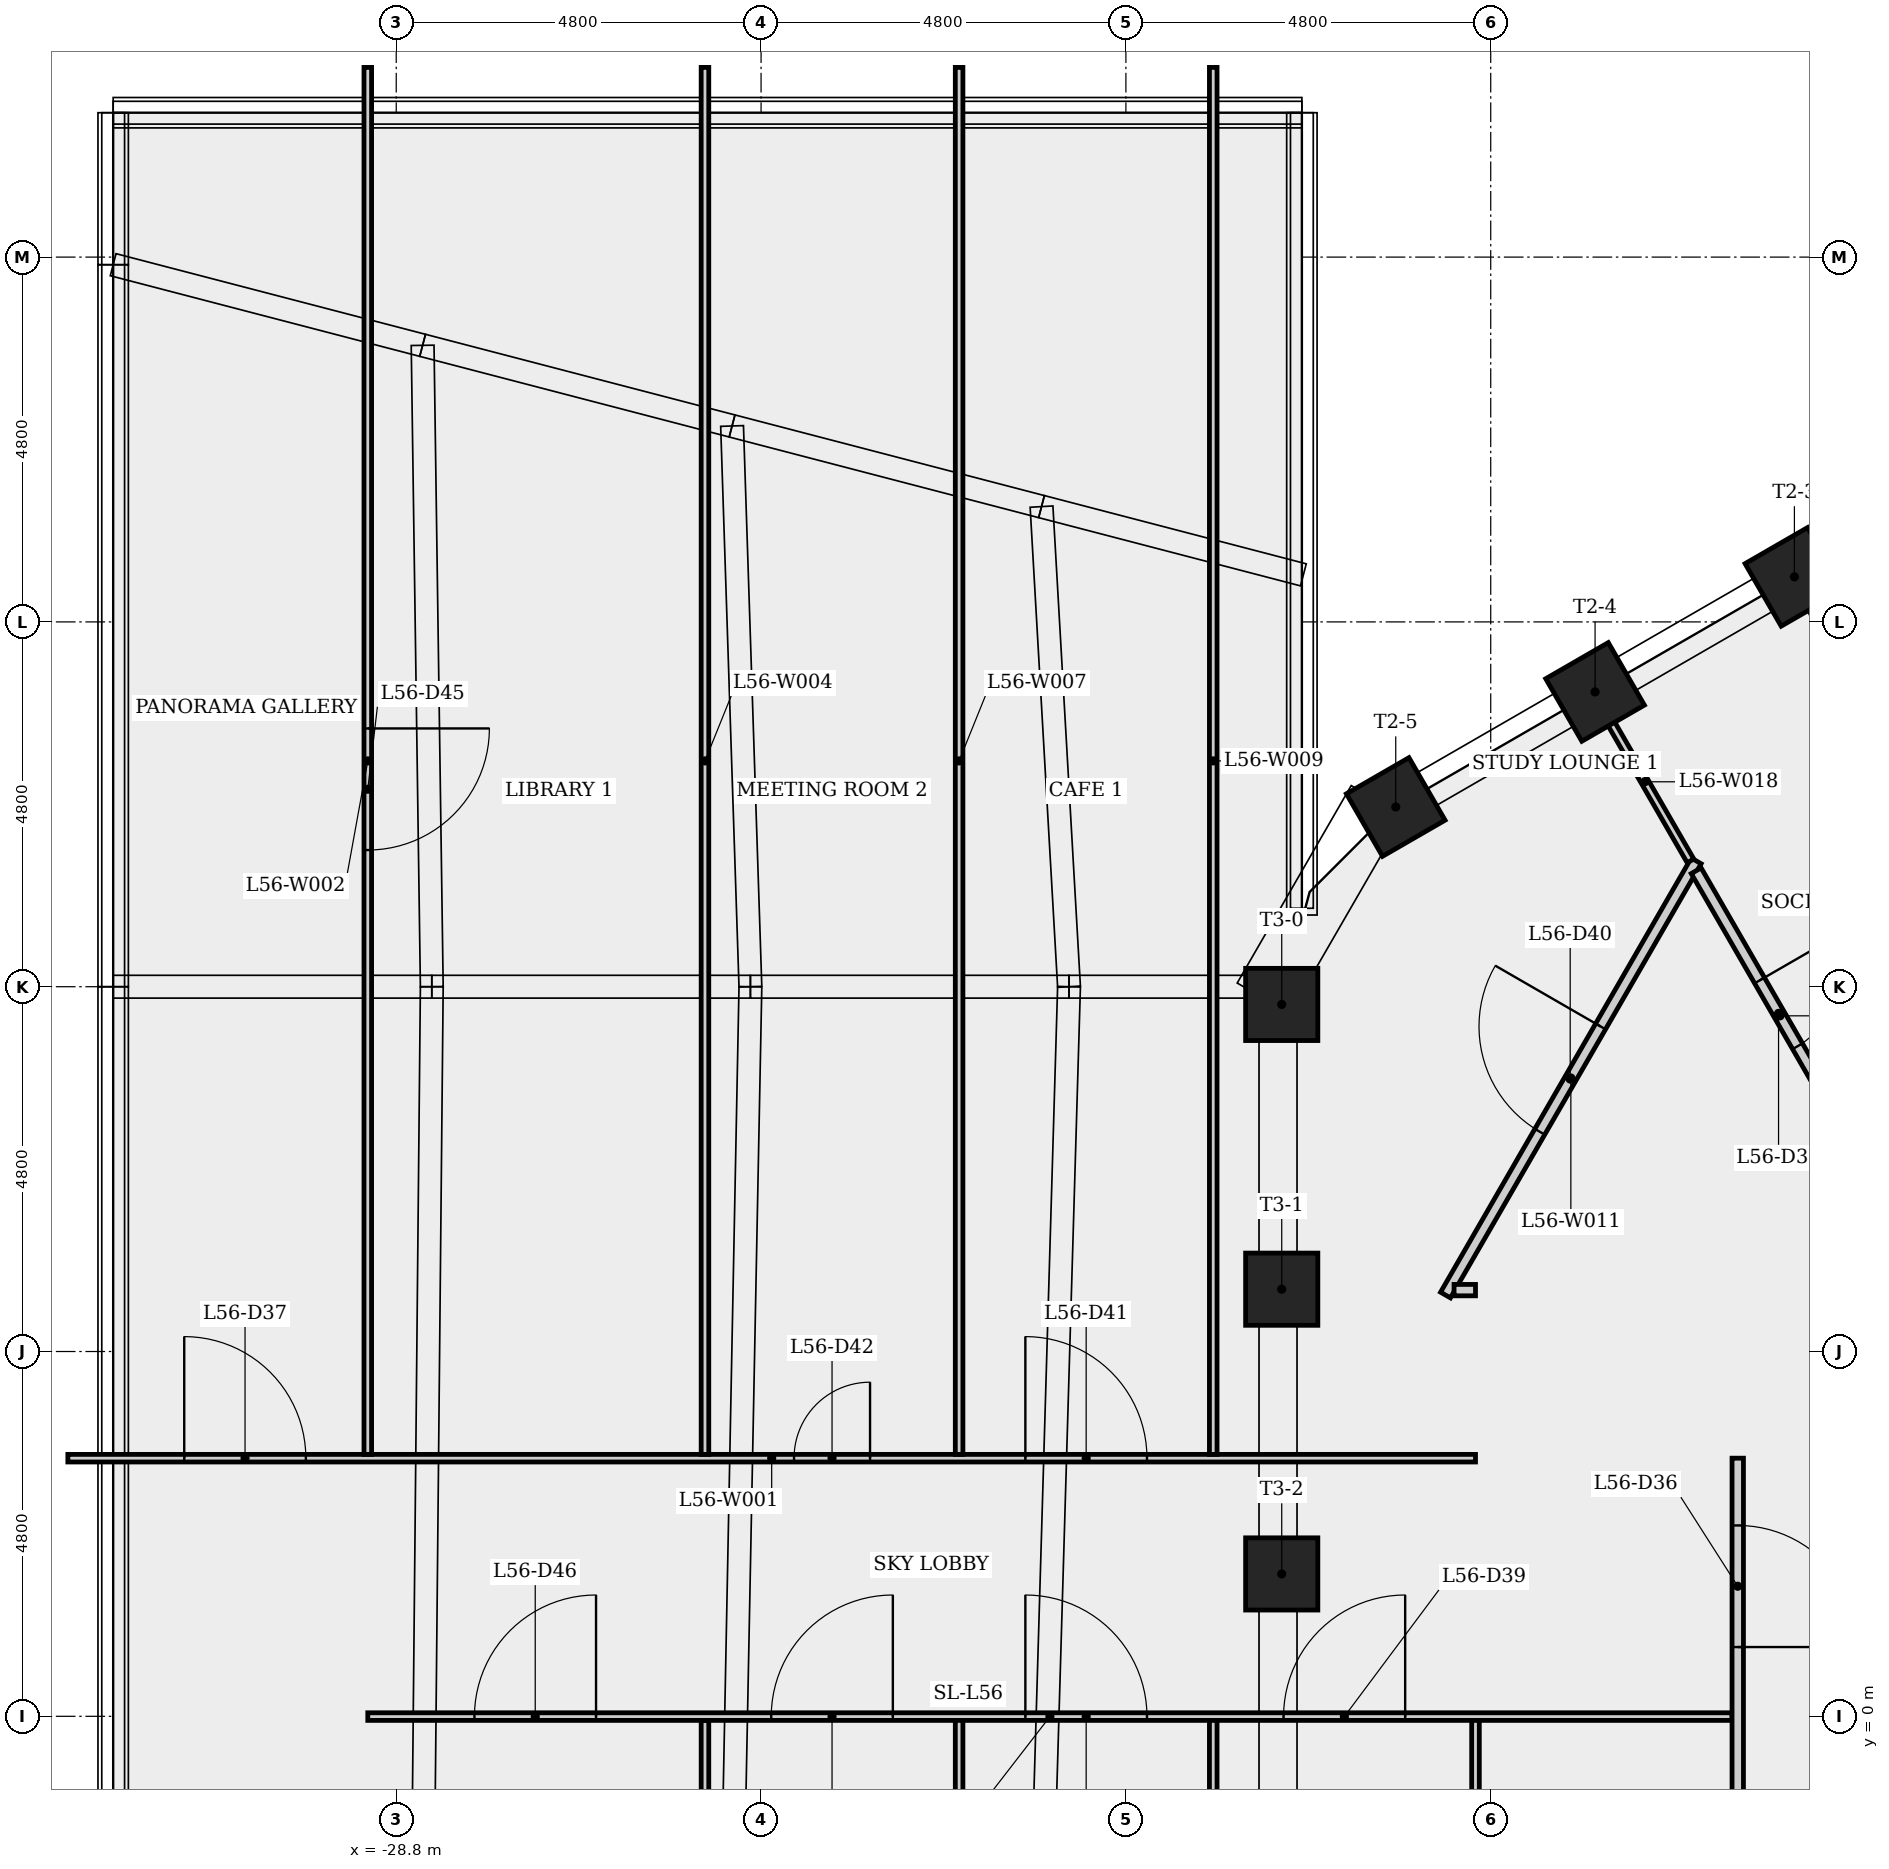
"""IFC4 building model, lengths in metres.
Left out: names, types, materials, properties, quantities, classifications, styles, units other than length and angle.
Written with IfcOpenShell. Run it as: python <this file> out.ifc"""

import sys

from ifc_helpers import new_model, si_unit, direction, frame, frame_2d, origin, origin_2d, place, context, subcontext, project, spatial, rectangle, extrude, element, fill, save


model = new_model("IFC4")
c1 = context("Model", 3, precision=1e-05, world=origin(), true_north=direction((0.0, 1.0)))
c2 = subcontext(c1, "Body", "Model", "MODEL_VIEW")
j1 = project(units=[si_unit("LENGTHUNIT", "METRE"), si_unit("PLANEANGLEUNIT", "RADIAN")], contexts=[c1])
p1 = place(None, origin())
s1 = spatial("IfcSite", under=j1, at=p1, CompositionType="ELEMENT")
p2 = place(p1, origin())
s2 = spatial("IfcBuilding", under=s1, at=p2, CompositionType="ELEMENT")
p3 = place(p2, frame((0.0, 0.0, 210.1)))
s3 = spatial("IfcBuildingStorey", under=s2, at=p3, CompositionType="ELEMENT", Elevation=210.1)
for number, where, z_axis, x_axis in (
    (1, (-10.405, 14.993, 0.0), (0.0, 0.0, 1.0), (-0.5, 0.866, 0.0)),
    (2, (-13.027, 13.479, 0.0), (0.0, 0.0, 1.0), (-0.5, 0.866, 0.0)),
    (3, (-15.65, 11.965, 0.0), (0.0, 0.0, 1.0), (-0.5, 0.866, 0.0)),
    (4, (-17.15, 9.366, 0.0), (0.0, 0.0, 1.0), (-1.0, 0.0, 0.0)),
    (5, (-17.15, 5.62, 0.0), (0.0, 0.0, 1.0), (-1.0, 0.0, 0.0)),
    (6, (-17.15, 1.873, 0.0), (0.0, 0.0, 1.0), (-1.0, 0.0, 0.0)),
):
    element("IfcColumn", number, at=place(p3, frame(where, z_axis=z_axis, x_axis=x_axis)), inside=s3, PredefinedType="COLUMN", context=c2, shape_type="SweptSolid", body=[
        extrude(rectangle(XDim=0.95, YDim=0.95, at=origin_2d()), origin(), (0.0, 0.0, 1.0), 4.0),
    ])
p4 = place(p3, frame((-33.12, 3.396, 0.0), z_axis=(0.0, 0.0, 1.0), x_axis=(1.0, 0.0, 0.0)))
e7 = element("IfcWall", 7, at=p4, inside=s3, PredefinedType="PARTITIONING", context=c2, shape_type="SweptSolid", body=[
    extrude(rectangle(XDim=18.52, YDim=0.1, at=frame_2d((9.26, 0.0))), origin(), (0.0, 0.0, 1.0), 3.6),
])
p5 = place(p4, frame((1.531, 0.0, 0.0)))
e8 = element("IfcOpeningElement", 8, at=p5, cuts=e7, PredefinedType="OPENING", context=c2, shape_type="SweptSolid", body=[
    extrude(rectangle(XDim=1.6, YDim=2.1, at=frame_2d((0.8, 1.05))), frame((0.0, 0.06, 0.0), z_axis=(0.0, -1.0, 0.0), x_axis=(1.0, 0.0, 0.0)), (0.0, 0.0, 1.0), 0.12),
])
p6 = place(p4, frame((12.598, 0.0, 0.0)))
e9 = element("IfcOpeningElement", 9, at=p6, cuts=e7, PredefinedType="OPENING", context=c2, shape_type="SweptSolid", body=[
    extrude(rectangle(XDim=1.6, YDim=2.1, at=frame_2d((0.8, 1.05))), frame((0.0, 0.06, 0.0), z_axis=(0.0, -1.0, 0.0), x_axis=(1.0, 0.0, 0.0)), (0.0, 0.0, 1.0), 0.12),
])
p7 = place(p4, frame((9.554, 0.0, 0.0)))
e10 = element("IfcOpeningElement", 10, at=p7, cuts=e7, PredefinedType="OPENING", context=c2, shape_type="SweptSolid", body=[
    extrude(rectangle(XDim=1.0, YDim=2.1, at=frame_2d((0.5, 1.05))), frame((0.0, 0.06, 0.0), z_axis=(0.0, -1.0, 0.0), x_axis=(1.0, 0.0, 0.0)), (0.0, 0.0, 1.0), 0.12),
])
p8 = place(p3, frame((-29.174, 21.696, 0.0), z_axis=(0.0, 0.0, 1.0), x_axis=(0.0, -1.0, 0.0)))
e11 = element("IfcWall", 11, at=p8, inside=s3, PredefinedType="PARTITIONING", context=c2, shape_type="SweptSolid", body=[
    extrude(rectangle(XDim=18.25, YDim=0.1, at=frame_2d((9.125, 0.0))), origin(), (0.0, 0.0, 1.0), 3.6),
])
p9 = place(p8, frame((8.698, 0.0, 0.0)))
e12 = element("IfcOpeningElement", 12, at=p9, cuts=e11, PredefinedType="OPENING", context=c2, shape_type="SweptSolid", body=[
    extrude(rectangle(XDim=1.6, YDim=2.1, at=frame_2d((0.8, 1.05))), frame((0.0, 0.06, 0.0), z_axis=(0.0, -1.0, 0.0), x_axis=(1.0, 0.0, 0.0)), (0.0, 0.0, 1.0), 0.12),
])
p10 = place(p3, frame((-24.738, -17.496, 0.0), z_axis=(0.0, 0.0, 1.0), x_axis=(0.0, 1.0, 0.0)))
e13 = element("IfcWall", 13, at=p10, inside=s3, PredefinedType="PARTITIONING", context=c2, shape_type="SweptSolid", body=[
    extrude(rectangle(XDim=17.442, YDim=0.1, at=frame_2d((8.721, 0.0))), origin(), (0.0, 0.0, 1.0), 3.275),
])
p11 = place(p3, frame((-24.738, 3.446, 0.0), z_axis=(0.0, 0.0, 1.0), x_axis=(0.0, 1.0, 0.0)))
e14 = element("IfcWall", 14, at=p11, inside=s3, PredefinedType="PARTITIONING", context=c2, shape_type="SweptSolid", body=[
    extrude(rectangle(XDim=18.25, YDim=0.1, at=frame_2d((9.125, 0.0))), origin(), (0.0, 0.0, 1.0), 3.6),
])
p12 = place(p3, frame((-29.174, -0.004, 0.0), z_axis=(0.0, 0.0, 1.0), x_axis=(1.0, 0.0, 0.0)))
e15 = element("IfcWall", 15, at=p12, inside=s3, PredefinedType="PARTITIONING", context=c2, shape_type="SweptSolid", body=[
    extrude(rectangle(XDim=17.949, YDim=0.1, at=frame_2d((8.975, 0.0))), origin(), (0.0, 0.0, 1.0), 3.6),
])
p13 = place(p12, frame((12.049, 0.0, 0.0)))
e16 = element("IfcOpeningElement", 16, at=p13, cuts=e15, PredefinedType="OPENING", context=c2, shape_type="SweptSolid", body=[
    extrude(rectangle(XDim=1.6, YDim=2.1, at=frame_2d((0.8, 1.05))), frame((0.0, 0.06, 0.0), z_axis=(0.0, -1.0, 0.0), x_axis=(1.0, 0.0, 0.0)), (0.0, 0.0, 1.0), 0.12),
])
p14 = place(p12, frame((8.652, 0.0, 0.0)))
e17 = element("IfcOpeningElement", 17, at=p14, cuts=e15, PredefinedType="OPENING", context=c2, shape_type="SweptSolid", body=[
    extrude(rectangle(XDim=1.6, YDim=2.1, at=frame_2d((0.8, 1.05))), frame((0.0, 0.06, 0.0), z_axis=(0.0, -1.0, 0.0), x_axis=(1.0, 0.0, 0.0)), (0.0, 0.0, 1.0), 0.12),
])
p15 = place(p12, frame((5.308, 0.0, 0.0)))
e18 = element("IfcOpeningElement", 18, at=p15, cuts=e15, PredefinedType="OPENING", context=c2, shape_type="SweptSolid", body=[
    extrude(rectangle(XDim=1.6, YDim=2.1, at=frame_2d((0.8, 1.05))), frame((0.0, 0.06, 0.0), z_axis=(0.0, -1.0, 0.0), x_axis=(1.0, 0.0, 0.0)), (0.0, 0.0, 1.0), 0.12),
])
p16 = place(p12, frame((1.403, 0.0, 0.0)))
e19 = element("IfcOpeningElement", 19, at=p16, cuts=e15, PredefinedType="OPENING", context=c2, shape_type="SweptSolid", body=[
    extrude(rectangle(XDim=1.6, YDim=2.1, at=frame_2d((0.8, 1.05))), frame((0.0, 0.06, 0.0), z_axis=(0.0, -1.0, 0.0), x_axis=(1.0, 0.0, 0.0)), (0.0, 0.0, 1.0), 0.12),
])
p17 = place(p3, frame((-21.394, -17.496, 0.0), z_axis=(0.0, 0.0, 1.0), x_axis=(0.0, 1.0, 0.0)))
e20 = element("IfcWall", 20, at=p17, inside=s3, PredefinedType="PARTITIONING", context=c2, shape_type="SweptSolid", body=[
    extrude(rectangle(XDim=17.442, YDim=0.1, at=frame_2d((8.721, 0.0))), origin(), (0.0, 0.0, 1.0), 3.6),
])
p18 = place(p3, frame((-21.394, 3.446, 0.0), z_axis=(0.0, 0.0, 1.0), x_axis=(0.0, 1.0, 0.0)))
e21 = element("IfcWall", 21, at=p18, inside=s3, PredefinedType="PARTITIONING", context=c2, shape_type="SweptSolid", body=[
    extrude(rectangle(XDim=18.25, YDim=0.1, at=frame_2d((9.125, 0.0))), origin(), (0.0, 0.0, 1.0), 3.6),
])
p19 = place(p3, frame((-18.051, -17.496, 0.0), z_axis=(0.0, 0.0, 1.0), x_axis=(0.0, 1.0, 0.0)))
e22 = element("IfcWall", 22, at=p19, inside=s3, PredefinedType="PARTITIONING", context=c2, shape_type="SweptSolid", body=[
    extrude(rectangle(XDim=17.442, YDim=0.1, at=frame_2d((8.721, 0.0))), origin(), (0.0, 0.0, 1.0), 3.6),
])
p20 = place(p3, frame((-18.051, 3.446, 0.0), z_axis=(0.0, 0.0, 1.0), x_axis=(0.0, 1.0, 0.0)))
e23 = element("IfcWall", 23, at=p20, inside=s3, PredefinedType="PARTITIONING", context=c2, shape_type="SweptSolid", body=[
    extrude(rectangle(XDim=18.25, YDim=0.1, at=frame_2d((9.125, 0.0))), origin(), (0.0, 0.0, 1.0), 3.6),
])
p21 = place(p3, frame((-14.995, 5.543, 0.0), z_axis=(0.0, 0.0, 1.0), x_axis=(0.500000102728, 0.866025344474, 0.0)))
e24 = element("IfcWall", 24, at=p21, inside=s3, PredefinedType="PARTITIONING", context=c2, shape_type="SweptSolid", body=[
    extrude(rectangle(XDim=6.597, YDim=0.15, at=frame_2d((3.298, 0.0))), origin(), (0.0, 0.0, 1.0), 3.6),
])
p22 = place(p21, frame((2.481, 0.0, 0.0)))
e25 = element("IfcOpeningElement", 25, at=p22, cuts=e24, PredefinedType="OPENING", context=c2, shape_type="SweptSolid", body=[
    extrude(rectangle(XDim=1.6, YDim=2.1, at=frame_2d((0.8, 1.05))), frame((0.0, 0.085, 0.0), z_axis=(0.0, -1.0, 0.0), x_axis=(1.0, 0.0, 0.0)), (0.0, 0.0, 1.0), 0.17),
])
p23 = place(p3, frame((-14.6, -10.789, 0.0), z_axis=(0.0, 0.0, 1.0), x_axis=(0.0, 1.0, 0.0)))
e26 = element("IfcWall", 26, at=p23, inside=s3, PredefinedType="PARTITIONING", context=c2, shape_type="SweptSolid", body=[
    extrude(rectangle(XDim=10.735, YDim=0.1, at=frame_2d((5.368, 0.0))), origin(), (0.0, 0.0, 1.0), 3.6),
])
p24 = place(p3, frame((-14.6, 5.608, 0.0), z_axis=(0.0, 0.0, 1.0), x_axis=(-1.0, 0.0, 0.0)))
e27 = element("IfcWall", 27, at=p24, inside=s3, PredefinedType="PARTITIONING", context=c2, shape_type="SweptSolid", body=[
    extrude(rectangle(XDim=0.282, YDim=0.15, at=frame_2d((0.141, 0.0))), origin(), (0.0, 0.0, 1.0), 3.6),
])
p25 = place(p3, frame((-11.697, 11.126, 0.0), z_axis=(0.0, 0.0, 1.0), x_axis=(0.499992488471, -0.866029740524, 0.0)))
e28 = element("IfcWall", 28, at=p25, inside=s3, PredefinedType="PARTITIONING", context=c2, shape_type="SweptSolid", body=[
    extrude(rectangle(XDim=4.409, YDim=0.15, at=frame_2d((2.204, 0.0))), origin(), (0.0, 0.0, 1.0), 3.6),
])
p26 = place(p25, frame((1.667, 0.0, 0.0)))
e29 = element("IfcOpeningElement", 29, at=p26, cuts=e28, PredefinedType="OPENING", context=c2, shape_type="SweptSolid", body=[
    extrude(rectangle(XDim=1.0, YDim=2.1, at=frame_2d((0.5, 1.05))), frame((0.0, 0.085, 0.0), z_axis=(0.0, -1.0, 0.0), x_axis=(1.0, 0.0, 0.0)), (0.0, 0.0, 1.0), 0.17),
])
p27 = place(p3, frame((-11.771, 11.256, 0.0), z_axis=(0.0, 0.0, 1.0), x_axis=(-0.50000677744, 0.866021490792, 0.0)))
e30 = element("IfcWall", 30, at=p27, inside=s3, PredefinedType="PARTITIONING", context=c2, shape_type="SweptSolid", body=[
    extrude(rectangle(XDim=2.403, YDim=0.1, at=frame_2d((1.202, 0.0))), origin(), (0.0, 0.0, 1.0), 3.6),
])
p28 = place(p3, frame((-11.15, 3.396, 0.0), z_axis=(0.0, 0.0, 1.0), x_axis=(0.0, -1.0, 0.0)))
e31 = element("IfcWall", 31, at=p28, inside=s3, PredefinedType="PARTITIONING", context=c2, shape_type="SweptSolid", body=[
    extrude(rectangle(XDim=9.228, YDim=0.15, at=frame_2d((4.614, 0.0))), origin(), (0.0, 0.0, 1.0), 3.6),
])
p29 = place(p28, frame((0.885, 0.0, 0.0)))
e32 = element("IfcOpeningElement", 32, at=p29, cuts=e31, PredefinedType="OPENING", context=c2, shape_type="SweptSolid", body=[
    extrude(rectangle(XDim=1.6, YDim=2.1, at=frame_2d((0.8, 1.05))), frame((0.0, 0.085, 0.0), z_axis=(0.0, -1.0, 0.0), x_axis=(1.0, 0.0, 0.0)), (0.0, 0.0, 1.0), 0.17),
])
p30 = place(p28, frame((5.829, 0.0, 0.0)))
e33 = element("IfcOpeningElement", 33, at=p30, cuts=e31, PredefinedType="OPENING", context=c2, shape_type="SweptSolid", body=[
    extrude(rectangle(XDim=1.0, YDim=2.1, at=frame_2d((0.5, 1.05))), frame((0.0, 0.085, 0.0), z_axis=(0.0, -1.0, 0.0), x_axis=(1.0, 0.0, 0.0)), (0.0, 0.0, 1.0), 0.17),
])
p31 = place(p3, frame((-6.931, 8.96, 0.0), z_axis=(0.0, 0.0, 1.0), x_axis=(-0.499982511794, 0.866035500369, 0.0)))
e34 = element("IfcWall", 34, at=p31, inside=s3, PredefinedType="PARTITIONING", context=c2, shape_type="SweptSolid", body=[
    extrude(rectangle(XDim=6.962, YDim=0.1, at=frame_2d((3.481, 0.0))), origin(), (0.0, 0.0, 1.0), 3.6),
])
p32 = place(p26, origin())
e35 = element("IfcDoor", 35, at=p32, inside=s3, OperationType="SINGLE_SWING_LEFT", PredefinedType="DOOR", context=c2, shape_type="SweptSolid", body=[
    extrude(rectangle(XDim=1.0, YDim=2.1, at=frame_2d((0.5, 1.05))), frame((0.0, 0.025, 0.0), z_axis=(0.0, -1.0, 0.0), x_axis=(1.0, 0.0, 0.0)), (0.0, 0.0, 1.0), 0.05),
])
fill(e29, e35)
p33 = place(p29, origin())
e36 = element("IfcDoor", 36, at=p33, inside=s3, OperationType="SINGLE_SWING_RIGHT", PredefinedType="DOOR", context=c2, shape_type="SweptSolid", body=[
    extrude(rectangle(XDim=1.6, YDim=2.1, at=frame_2d((0.8, 1.05))), frame((0.0, 0.025, 0.0), z_axis=(0.0, -1.0, 0.0), x_axis=(1.0, 0.0, 0.0)), (0.0, 0.0, 1.0), 0.05),
])
fill(e32, e36)
p34 = place(p5, origin())
e37 = element("IfcDoor", 37, at=p34, inside=s3, OperationType="SINGLE_SWING_LEFT", PredefinedType="DOOR", context=c2, shape_type="SweptSolid", body=[
    extrude(rectangle(XDim=1.6, YDim=2.1, at=frame_2d((0.8, 1.05))), frame((0.0, 0.025, 0.0), z_axis=(0.0, -1.0, 0.0), x_axis=(1.0, 0.0, 0.0)), (0.0, 0.0, 1.0), 0.05),
])
fill(e8, e37)
p35 = place(p13, origin())
e38 = element("IfcDoor", 38, at=p35, inside=s3, OperationType="SINGLE_SWING_RIGHT", PredefinedType="DOOR", context=c2, shape_type="SweptSolid", body=[
    extrude(rectangle(XDim=1.6, YDim=2.1, at=frame_2d((0.8, 1.05))), frame((0.0, 0.025, 0.0), z_axis=(0.0, -1.0, 0.0), x_axis=(1.0, 0.0, 0.0)), (0.0, 0.0, 1.0), 0.05),
])
fill(e16, e38)
p36 = place(p22, origin())
e39 = element("IfcDoor", 39, at=p36, inside=s3, OperationType="SINGLE_SWING_RIGHT", PredefinedType="DOOR", context=c2, shape_type="SweptSolid", body=[
    extrude(rectangle(XDim=1.6, YDim=2.1, at=frame_2d((0.8, 1.05))), frame((0.0, 0.025, 0.0), z_axis=(0.0, -1.0, 0.0), x_axis=(1.0, 0.0, 0.0)), (0.0, 0.0, 1.0), 0.05),
])
fill(e25, e39)
p37 = place(p6, origin())
e40 = element("IfcDoor", 40, at=p37, inside=s3, OperationType="SINGLE_SWING_LEFT", PredefinedType="DOOR", context=c2, shape_type="SweptSolid", body=[
    extrude(rectangle(XDim=1.6, YDim=2.1, at=frame_2d((0.8, 1.05))), frame((0.0, 0.025, 0.0), z_axis=(0.0, -1.0, 0.0), x_axis=(1.0, 0.0, 0.0)), (0.0, 0.0, 1.0), 0.05),
])
fill(e9, e40)
p38 = place(p7, origin())
e41 = element("IfcDoor", 41, at=p38, inside=s3, OperationType="SINGLE_SWING_RIGHT", PredefinedType="DOOR", context=c2, shape_type="SweptSolid", body=[
    extrude(rectangle(XDim=1.0, YDim=2.1, at=frame_2d((0.5, 1.05))), frame((0.0, 0.025, 0.0), z_axis=(0.0, -1.0, 0.0), x_axis=(1.0, 0.0, 0.0)), (0.0, 0.0, 1.0), 0.05),
])
fill(e10, e41)
p39 = place(p14, origin())
e42 = element("IfcDoor", 42, at=p39, inside=s3, OperationType="SINGLE_SWING_LEFT", PredefinedType="DOOR", context=c2, shape_type="SweptSolid", body=[
    extrude(rectangle(XDim=1.6, YDim=2.1, at=frame_2d((0.8, 1.05))), frame((0.0, 0.025, 0.0), z_axis=(0.0, -1.0, 0.0), x_axis=(1.0, 0.0, 0.0)), (0.0, 0.0, 1.0), 0.05),
])
fill(e17, e42)
p40 = place(p15, origin())
e43 = element("IfcDoor", 43, at=p40, inside=s3, OperationType="SINGLE_SWING_RIGHT", PredefinedType="DOOR", context=c2, shape_type="SweptSolid", body=[
    extrude(rectangle(XDim=1.6, YDim=2.1, at=frame_2d((0.8, 1.05))), frame((0.0, 0.025, 0.0), z_axis=(0.0, -1.0, 0.0), x_axis=(1.0, 0.0, 0.0)), (0.0, 0.0, 1.0), 0.05),
])
fill(e18, e43)
p41 = place(p9, origin())
e44 = element("IfcDoor", 44, at=p41, inside=s3, OperationType="SINGLE_SWING_LEFT", PredefinedType="DOOR", context=c2, shape_type="SweptSolid", body=[
    extrude(rectangle(XDim=1.6, YDim=2.1, at=frame_2d((0.8, 1.05))), frame((0.0, 0.025, 0.0), z_axis=(0.0, -1.0, 0.0), x_axis=(1.0, 0.0, 0.0)), (0.0, 0.0, 1.0), 0.05),
])
fill(e12, e44)
p42 = place(p16, origin())
e45 = element("IfcDoor", 45, at=p42, inside=s3, OperationType="SINGLE_SWING_RIGHT", PredefinedType="DOOR", context=c2, shape_type="SweptSolid", body=[
    extrude(rectangle(XDim=1.6, YDim=2.1, at=frame_2d((0.8, 1.05))), frame((0.0, 0.025, 0.0), z_axis=(0.0, -1.0, 0.0), x_axis=(1.0, 0.0, 0.0)), (0.0, 0.0, 1.0), 0.05),
])
fill(e19, e45)
save(model, sys.argv[1])
